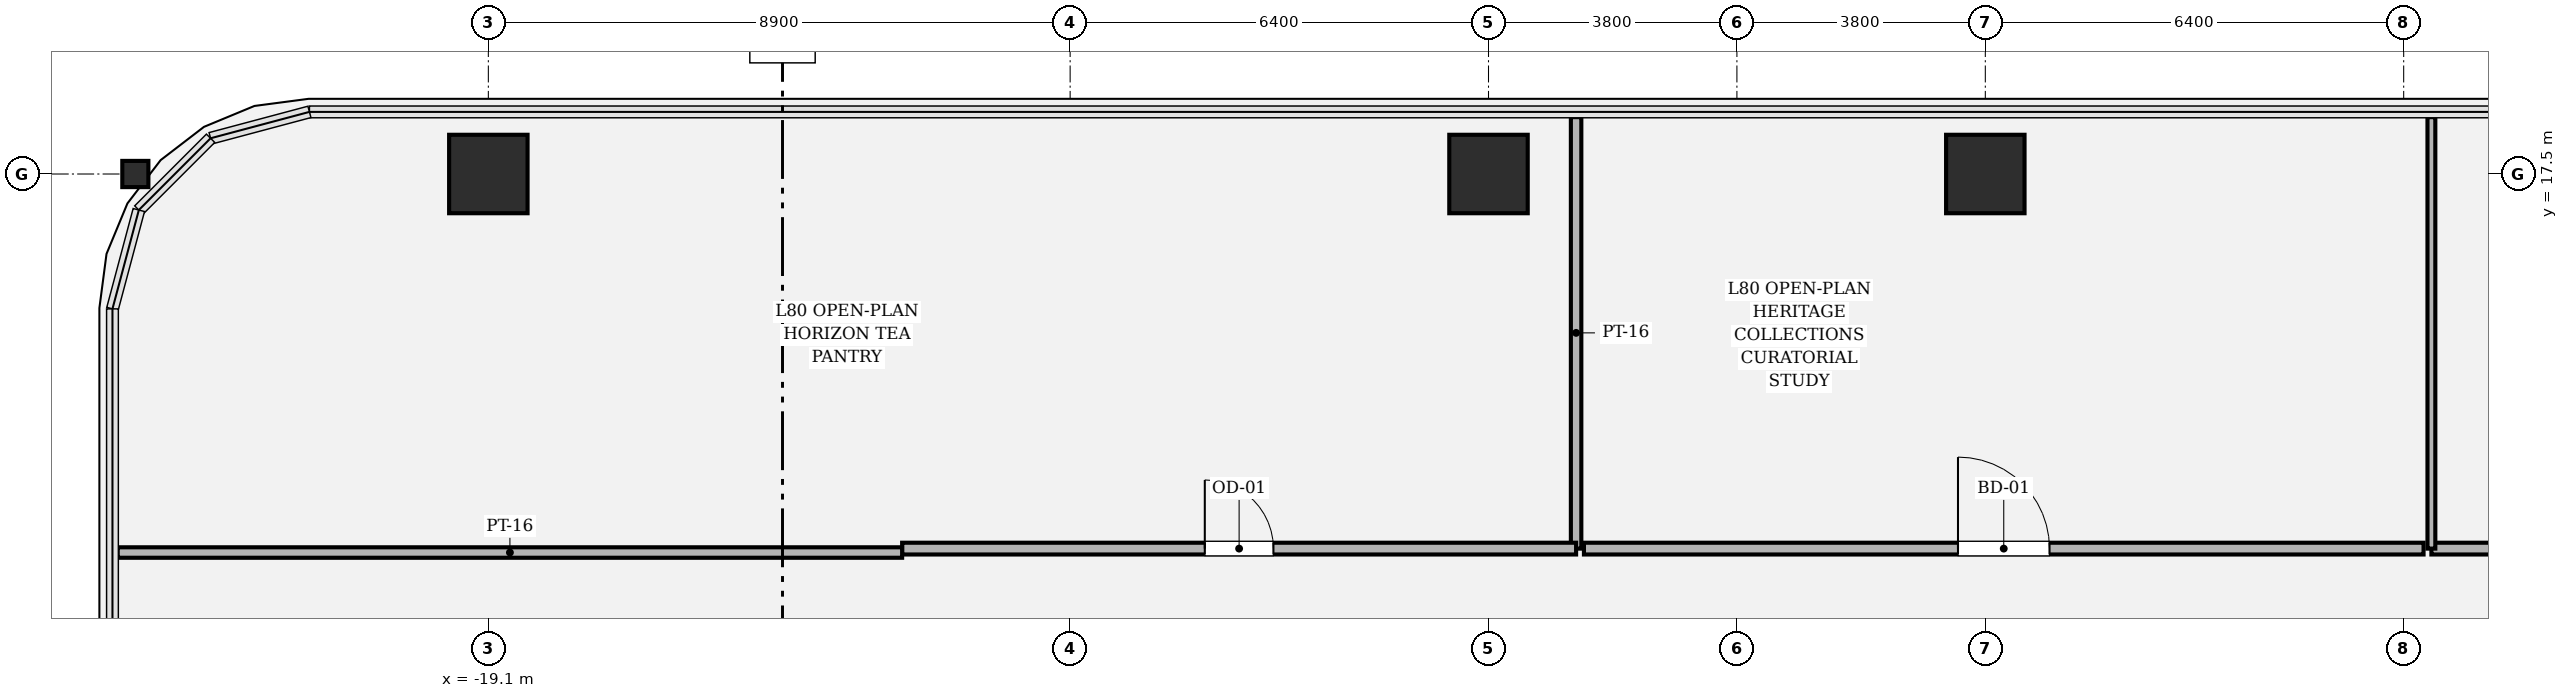
"""IFC4 building model, lengths in metres.
Left out: names, types, materials, properties, quantities, classifications, styles, units other than length and angle.
Written with IfcOpenShell. Run it as: python <this file> out.ifc"""

import sys

from ifc_helpers import new_model, si_unit, direction, frame, frame_2d, origin, origin_2d, place, context, subcontext, project, spatial, rectangle, hollow_rectangle, i_section, extrude, element, fill, save


model = new_model("IFC4")
c1 = context("Model", 3, precision=1e-05, world=origin(), true_north=direction((0.0, 1.0)))
c2 = subcontext(c1, "Body", "Model", "MODEL_VIEW")
j1 = project(units=[si_unit("LENGTHUNIT", "METRE"), si_unit("PLANEANGLEUNIT", "RADIAN")], contexts=[c1])
p1 = place(None, origin())
s1 = spatial("IfcSite", under=j1, at=p1, CompositionType="ELEMENT")
p2 = place(p1, origin())
s2 = spatial("IfcBuilding", under=s1, at=p2, CompositionType="ELEMENT")
p3 = place(p2, frame((0.0, 0.0, 339.0)))
s3 = spatial("IfcBuildingStorey", under=s2, at=p3, CompositionType="ELEMENT", Elevation=339.0)
for number, where, z_axis, x_axis in (
    (1, (3.8, 17.5, 0.0), (0.0, 0.0, 1.0), (1.0, 0.0, 0.0)),
    (2, (-3.8, 17.5, 0.0), (0.0, 0.0, 1.0), (1.0, 0.0, 0.0)),
    (3, (-19.1, 17.5, 0.0), (0.0, 0.0, 1.0), (1.0, 0.0, 0.0)),
):
    element("IfcColumn", number, at=place(p3, frame(where, z_axis=z_axis, x_axis=x_axis)), inside=s3, PredefinedType="COLUMN", context=c2, shape_type="SweptSolid", body=[
        extrude(hollow_rectangle(XDim=1.2, YDim=1.2, WallThickness=0.035, at=origin_2d()), origin(), (0.0, 0.0, 1.0), 4.8),
    ])
p4 = place(p3, frame((-24.5, 17.5, 0.0), z_axis=(0.0, 0.0, 1.0), x_axis=(0.0, 1.0, 0.0)))
e4 = element("IfcColumn", 4, at=p4, inside=s3, PredefinedType="COLUMN", context=c2, shape_type="SweptSolid", body=[
    extrude(i_section(OverallWidth=0.401, OverallDepth=0.399, WebThickness=0.025, FlangeThickness=0.04, FilletRadius=0.018, at=origin_2d()), origin(), (0.0, 0.0, 1.0), 4.798),
])
p5 = place(p3, frame((-2.46, 18.37, 0.0), z_axis=(0.0, 0.0, 1.0), x_axis=(0.0, -1.0, 0.0)))
e5 = element("IfcWall", 5, at=p5, inside=s3, PredefinedType="PARTITIONING", context=c2, shape_type="SweptSolid", body=[
    extrude(rectangle(XDim=6.6, YDim=0.16, at=frame_2d((3.3, 0.0))), origin(), (0.0, 0.0, 1.0), 3.194),
])
p6 = place(p3, frame((-2.46, 11.77, 0.0), z_axis=(0.0, 0.0, 1.0), x_axis=(-1.0, 0.0, 0.0)))
e6 = element("IfcWall", 6, at=p6, inside=s3, PredefinedType="PARTITIONING", context=c2, shape_type="SweptSolid", body=[
    extrude(rectangle(XDim=10.31, YDim=0.18, at=frame_2d((5.155, 0.0))), origin(), (0.0, 0.0, 1.0), 3.194),
])
p7 = place(p6, frame((4.63, 0.0, 0.0)))
e7 = element("IfcOpeningElement", 7, at=p7, cuts=e6, PredefinedType="OPENING", context=c2, shape_type="SweptSolid", body=[
    extrude(rectangle(XDim=1.05, YDim=2.2, at=frame_2d((0.525, 1.1))), frame((0.0, 0.1, 0.0), z_axis=(0.0, -1.0, 0.0), x_axis=(1.0, 0.0, 0.0)), (0.0, 0.0, 1.0), 0.2),
])
p8 = place(p3, frame((-12.77, 11.71, 0.0), z_axis=(0.0, 0.0, 1.0), x_axis=(-1.0, 0.0, 0.0)))
e8 = element("IfcWall", 8, at=p8, inside=s3, PredefinedType="PARTITIONING", context=c2, shape_type="SweptSolid", body=[
    extrude(rectangle(XDim=12.0, YDim=0.16, at=frame_2d((6.0, 0.0))), origin(), (0.0, 0.0, 1.0), 3.194),
])
p9 = place(p3, frame((12.77, 11.77, 0.0), z_axis=(0.0, 0.0, 1.0), x_axis=(-1.0, 0.0, 0.0)))
e9 = element("IfcWall", 9, at=p9, inside=s3, PredefinedType="PARTITIONING", context=c2, shape_type="SweptSolid", body=[
    extrude(rectangle(XDim=2.146, YDim=0.18, at=frame_2d((1.073, 0.0))), origin(), (0.0, 0.0, 1.0), 4.52),
])
p10 = place(p3, frame((10.624, 11.77, 0.0), z_axis=(0.0, 0.0, 1.0), x_axis=(0.0, 1.0, 0.0)))
e10 = element("IfcWall", 10, at=p10, inside=s3, PredefinedType="PARTITIONING", context=c2, shape_type="SweptSolid", body=[
    extrude(rectangle(XDim=6.6, YDim=0.12, at=frame_2d((3.3, 0.0))), origin(), (0.0, 0.0, 1.0), 3.194),
])
p11 = place(p3, frame((10.504, 11.77, 0.0), z_axis=(0.0, 0.0, 1.0), x_axis=(-1.0, 0.0, 0.0)))
e11 = element("IfcWall", 11, at=p11, inside=s3, PredefinedType="PARTITIONING", context=c2, shape_type="SweptSolid", body=[
    extrude(rectangle(XDim=12.844, YDim=0.18, at=frame_2d((6.422, 0.0))), origin(), (0.0, 0.0, 1.0), 3.194),
])
p12 = place(p11, frame((5.722, 0.0, 0.0)))
e12 = element("IfcOpeningElement", 12, at=p12, cuts=e11, PredefinedType="OPENING", context=c2, shape_type="SweptSolid", body=[
    extrude(rectangle(XDim=1.4, YDim=2.25, at=frame_2d((0.7, 1.125))), frame((0.0, 0.1, 0.0), z_axis=(0.0, -1.0, 0.0), x_axis=(1.0, 0.0, 0.0)), (0.0, 0.0, 1.0), 0.2),
])
p13 = place(p7, origin())
e13 = element("IfcDoor", 13, at=p13, inside=s3, OperationType="SINGLE_SWING_RIGHT", PredefinedType="DOOR", context=c2, shape_type="SweptSolid", body=[
    extrude(rectangle(XDim=1.05, YDim=2.2, at=frame_2d((0.525, 1.1))), frame((0.0, 0.025, 0.0), z_axis=(0.0, -1.0, 0.0), x_axis=(1.0, 0.0, 0.0)), (0.0, 0.0, 1.0), 0.05),
])
fill(e7, e13)
p14 = place(p12, origin())
e14 = element("IfcDoor", 14, at=p14, inside=s3, OperationType="SINGLE_SWING_RIGHT", PredefinedType="DOOR", context=c2, shape_type="SweptSolid", body=[
    extrude(rectangle(XDim=1.4, YDim=2.25, at=frame_2d((0.7, 1.125))), frame((0.0, 0.025, 0.0), z_axis=(0.0, -1.0, 0.0), x_axis=(1.0, 0.0, 0.0)), (0.0, 0.0, 1.0), 0.05),
])
fill(e12, e14)
save(model, sys.argv[1])
